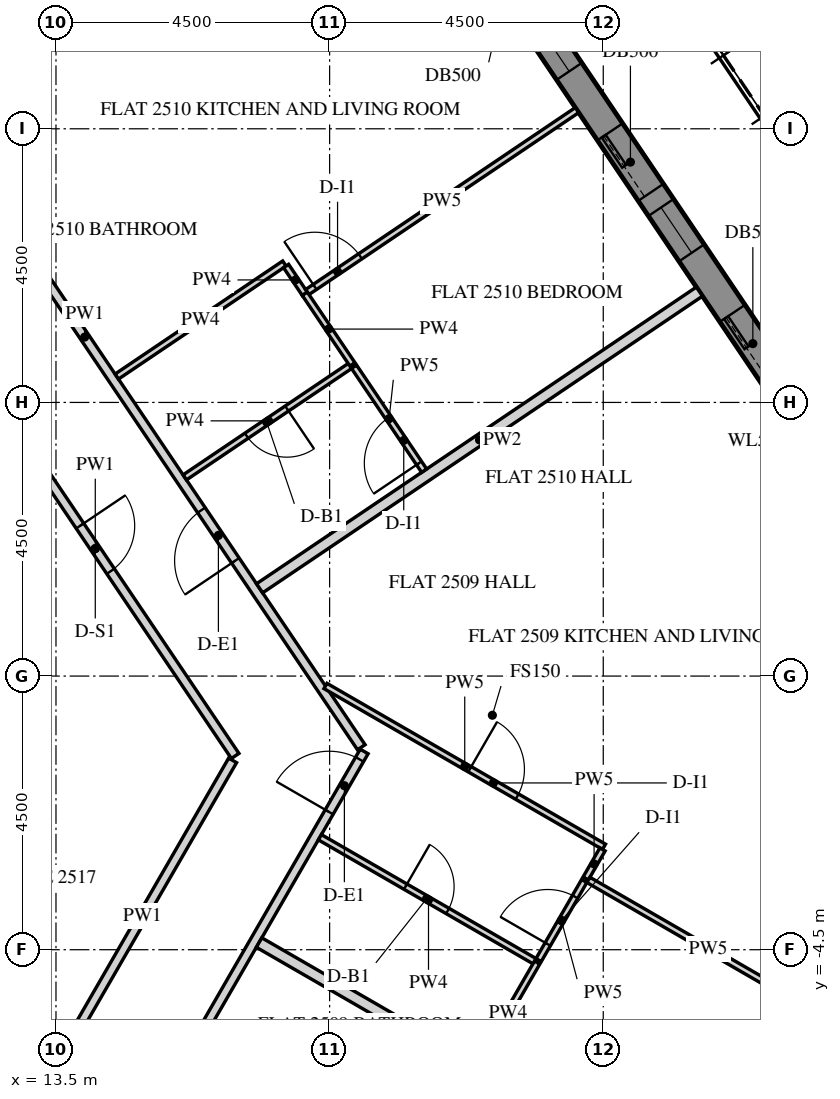
"""IFC4 building model, lengths in metres.
Left out: names, types, materials, properties, quantities, classifications, styles, units other than length and angle.
Written with IfcOpenShell. Run it as: python <this file> out.ifc"""

import sys

from ifc_helpers import new_model, si_unit, direction, frame, frame_2d, origin, place, context, subcontext, project, spatial, polyline, rectangle, outline, extrude, element, fill, save


model = new_model("IFC4")
c1 = context("Model", 3, precision=1e-05, world=origin(), true_north=direction((0.0, 1.0)))
c2 = subcontext(c1, "Body", "Model", "MODEL_VIEW")
j1 = project(units=[si_unit("LENGTHUNIT", "METRE"), si_unit("PLANEANGLEUNIT", "RADIAN")], contexts=[c1])
p1 = place(None, origin())
s1 = spatial("IfcSite", under=j1, at=p1, CompositionType="ELEMENT")
p2 = place(p1, origin())
s2 = spatial("IfcBuilding", under=s1, at=p2, CompositionType="ELEMENT")
p3 = place(p2, frame((0.0, 0.0, 314.7)))
s3 = spatial("IfcBuildingStorey", under=s2, at=p3, CompositionType="ELEMENT", Elevation=314.7)
p4 = place(p3, frame((16.451, -23.005, -0.15), z_axis=(0.0, 0.0, 1.0), x_axis=(0.500003737743, 0.866023245787, 0.0)))
e1 = element("IfcWall", 1, at=p4, inside=s3, PredefinedType="SOLIDWALL", context=c2, shape_type="SweptSolid", body=[
    extrude(outline(polyline([(-0.021, -0.25), (25.468, -0.25), (25.421, 0.25), (0.021, 0.25), (-0.021, -0.25)])), origin(), (0.0, 0.0, 1.0), 3.9),
])
p5 = place(p4, frame((2.522, 0.0, 0.75)))
e2 = element("IfcOpeningElement", 2, at=p5, cuts=e1, PredefinedType="OPENING", context=c2, shape_type="SweptSolid", body=[
    extrude(rectangle(XDim=2.4, YDim=2.7, at=frame_2d((1.2, 1.35))), frame((0.0, 0.26, 0.0), z_axis=(0.0, -1.0, 0.0), x_axis=(1.0, 0.0, 0.0)), (0.0, 0.0, 1.0), 0.52),
])
p6 = place(p4, frame((6.122, 0.0, 0.75)))
e3 = element("IfcOpeningElement", 3, at=p6, cuts=e1, PredefinedType="OPENING", context=c2, shape_type="SweptSolid", body=[
    extrude(rectangle(XDim=2.4, YDim=2.7, at=frame_2d((1.2, 1.35))), frame((0.0, 0.26, 0.0), z_axis=(0.0, -1.0, 0.0), x_axis=(1.0, 0.0, 0.0)), (0.0, 0.0, 1.0), 0.52),
])
p7 = place(p4, frame((9.722, 0.0, 0.75)))
e4 = element("IfcOpeningElement", 4, at=p7, cuts=e1, PredefinedType="OPENING", context=c2, shape_type="SweptSolid", body=[
    extrude(rectangle(XDim=2.4, YDim=2.7, at=frame_2d((1.2, 1.35))), frame((0.0, 0.26, 0.0), z_axis=(0.0, -1.0, 0.0), x_axis=(1.0, 0.0, 0.0)), (0.0, 0.0, 1.0), 0.52),
])
p8 = place(p4, frame((13.323, 0.0, 0.75)))
e5 = element("IfcOpeningElement", 5, at=p8, cuts=e1, PredefinedType="OPENING", context=c2, shape_type="SweptSolid", body=[
    extrude(rectangle(XDim=2.4, YDim=2.7, at=frame_2d((1.2, 1.35))), frame((0.0, 0.26, 0.0), z_axis=(0.0, -1.0, 0.0), x_axis=(1.0, 0.0, 0.0)), (0.0, 0.0, 1.0), 0.52),
])
p9 = place(p4, frame((16.922, 0.0, 0.75)))
e6 = element("IfcOpeningElement", 6, at=p9, cuts=e1, PredefinedType="OPENING", context=c2, shape_type="SweptSolid", body=[
    extrude(rectangle(XDim=2.4, YDim=2.7, at=frame_2d((1.2, 1.35))), frame((0.0, 0.26, 0.0), z_axis=(0.0, -1.0, 0.0), x_axis=(1.0, 0.0, 0.0)), (0.0, 0.0, 1.0), 0.52),
])
p10 = place(p4, frame((20.522, 0.0, 0.75)))
e7 = element("IfcOpeningElement", 7, at=p10, cuts=e1, PredefinedType="OPENING", context=c2, shape_type="SweptSolid", body=[
    extrude(rectangle(XDim=2.4, YDim=2.7, at=frame_2d((1.2, 1.35))), frame((0.0, 0.26, 0.0), z_axis=(0.0, -1.0, 0.0), x_axis=(1.0, 0.0, 0.0)), (0.0, 0.0, 1.0), 0.52),
])
p11 = place(p3, frame((26.706, 2.879, -0.15), z_axis=(0.0, 0.0, 1.0), x_axis=(-0.559197891507, 0.829034208061, 0.0)))
e8 = element("IfcWall", 8, at=p11, inside=s3, PredefinedType="SOLIDWALL", context=c2, shape_type="SweptSolid", body=[
    extrude(outline(polyline([(0.25, -0.25), (22.795, -0.25), (23.295, 0.25), (-0.25, 0.25), (0.25, -0.25)])), origin(), (0.0, 0.0, 1.0), 3.9),
])
p12 = place(p11, frame((1.323, 0.0, 1.05)))
e9 = element("IfcOpeningElement", 9, at=p12, cuts=e8, PredefinedType="OPENING", context=c2, shape_type="SweptSolid", body=[
    extrude(rectangle(XDim=0.9, YDim=1.5, at=frame_2d((0.45, 0.75))), frame((0.0, 0.26, 0.0), z_axis=(0.0, -1.0, 0.0), x_axis=(1.0, 0.0, 0.0)), (0.0, 0.0, 1.0), 0.52),
])
p13 = place(p11, frame((2.522, 0.0, 0.15)))
e10 = element("IfcOpeningElement", 10, at=p13, cuts=e8, PredefinedType="OPENING", context=c2, shape_type="SweptSolid", body=[
    extrude(rectangle(XDim=1.2, YDim=2.4, at=frame_2d((0.6, 1.2))), frame((0.0, 0.26, 0.0), z_axis=(0.0, -1.0, 0.0), x_axis=(1.0, 0.0, 0.0)), (0.0, 0.0, 1.0), 0.52),
])
p14 = place(p11, frame((4.922, 0.0, 1.05)))
e11 = element("IfcOpeningElement", 11, at=p14, cuts=e8, PredefinedType="OPENING", context=c2, shape_type="SweptSolid", body=[
    extrude(rectangle(XDim=0.9, YDim=1.5, at=frame_2d((0.45, 0.75))), frame((0.0, 0.26, 0.0), z_axis=(0.0, -1.0, 0.0), x_axis=(1.0, 0.0, 0.0)), (0.0, 0.0, 1.0), 0.52),
])
p15 = place(p11, frame((6.122, 0.0, 0.15)))
e12 = element("IfcOpeningElement", 12, at=p15, cuts=e8, PredefinedType="OPENING", context=c2, shape_type="SweptSolid", body=[
    extrude(rectangle(XDim=1.2, YDim=2.4, at=frame_2d((0.6, 1.2))), frame((0.0, 0.26, 0.0), z_axis=(0.0, -1.0, 0.0), x_axis=(1.0, 0.0, 0.0)), (0.0, 0.0, 1.0), 0.52),
])
p16 = place(p11, frame((8.522, 0.0, 1.05)))
e13 = element("IfcOpeningElement", 13, at=p16, cuts=e8, PredefinedType="OPENING", context=c2, shape_type="SweptSolid", body=[
    extrude(rectangle(XDim=0.9, YDim=1.5, at=frame_2d((0.45, 0.75))), frame((0.0, 0.26, 0.0), z_axis=(0.0, -1.0, 0.0), x_axis=(1.0, 0.0, 0.0)), (0.0, 0.0, 1.0), 0.52),
])
p17 = place(p11, frame((9.722, 0.0, 0.15)))
e14 = element("IfcOpeningElement", 14, at=p17, cuts=e8, PredefinedType="OPENING", context=c2, shape_type="SweptSolid", body=[
    extrude(rectangle(XDim=1.2, YDim=2.4, at=frame_2d((0.6, 1.2))), frame((0.0, 0.26, 0.0), z_axis=(0.0, -1.0, 0.0), x_axis=(1.0, 0.0, 0.0)), (0.0, 0.0, 1.0), 0.52),
])
p18 = place(p11, frame((12.122, 0.0, 1.05)))
e15 = element("IfcOpeningElement", 15, at=p18, cuts=e8, PredefinedType="OPENING", context=c2, shape_type="SweptSolid", body=[
    extrude(rectangle(XDim=0.9, YDim=1.5, at=frame_2d((0.45, 0.75))), frame((0.0, 0.26, 0.0), z_axis=(0.0, -1.0, 0.0), x_axis=(1.0, 0.0, 0.0)), (0.0, 0.0, 1.0), 0.52),
])
p19 = place(p11, frame((13.323, 0.0, 0.15)))
e16 = element("IfcOpeningElement", 16, at=p19, cuts=e8, PredefinedType="OPENING", context=c2, shape_type="SweptSolid", body=[
    extrude(rectangle(XDim=1.2, YDim=2.4, at=frame_2d((0.6, 1.2))), frame((0.0, 0.26, 0.0), z_axis=(0.0, -1.0, 0.0), x_axis=(1.0, 0.0, 0.0)), (0.0, 0.0, 1.0), 0.52),
])
p20 = place(p11, frame((15.722, 0.0, 1.05)))
e17 = element("IfcOpeningElement", 17, at=p20, cuts=e8, PredefinedType="OPENING", context=c2, shape_type="SweptSolid", body=[
    extrude(rectangle(XDim=0.9, YDim=1.5, at=frame_2d((0.45, 0.75))), frame((0.0, 0.26, 0.0), z_axis=(0.0, -1.0, 0.0), x_axis=(1.0, 0.0, 0.0)), (0.0, 0.0, 1.0), 0.52),
])
p21 = place(p11, frame((16.922, 0.0, 0.15)))
e18 = element("IfcOpeningElement", 18, at=p21, cuts=e8, PredefinedType="OPENING", context=c2, shape_type="SweptSolid", body=[
    extrude(rectangle(XDim=1.2, YDim=2.4, at=frame_2d((0.6, 1.2))), frame((0.0, 0.26, 0.0), z_axis=(0.0, -1.0, 0.0), x_axis=(1.0, 0.0, 0.0)), (0.0, 0.0, 1.0), 0.52),
])
p22 = place(p11, frame((19.323, 0.0, 1.05)))
e19 = element("IfcOpeningElement", 19, at=p22, cuts=e8, PredefinedType="OPENING", context=c2, shape_type="SweptSolid", body=[
    extrude(rectangle(XDim=0.9, YDim=1.5, at=frame_2d((0.45, 0.75))), frame((0.0, 0.26, 0.0), z_axis=(0.0, -1.0, 0.0), x_axis=(1.0, 0.0, 0.0)), (0.0, 0.0, 1.0), 0.52),
])
p23 = place(p11, frame((20.522, 0.0, 0.15)))
e20 = element("IfcOpeningElement", 20, at=p23, cuts=e8, PredefinedType="OPENING", context=c2, shape_type="SweptSolid", body=[
    extrude(rectangle(XDim=1.2, YDim=2.4, at=frame_2d((0.6, 1.2))), frame((0.0, 0.26, 0.0), z_axis=(0.0, -1.0, 0.0), x_axis=(1.0, 0.0, 0.0)), (0.0, 0.0, 1.0), 0.52),
])
p24 = place(p3, frame((11.229, -13.951, 0.0), z_axis=(0.0, 0.0, 1.0), x_axis=(0.499997948852, 0.866026588012, 0.0)))
e21 = element("IfcWall", 21, at=p24, inside=s3, PredefinedType="PARTITIONING", context=c2, shape_type="SweptSolid", body=[
    extrude(rectangle(XDim=14.677, YDim=0.15, at=frame_2d((7.339, 0.0))), origin(), (0.0, 0.0, 1.0), 2.988),
])
p25 = place(p24, frame((1.0, 0.0, 0.0)))
e22 = element("IfcOpeningElement", 22, at=p25, cuts=e21, PredefinedType="OPENING", context=c2, shape_type="SweptSolid", body=[
    extrude(rectangle(XDim=1.0, YDim=2.1, at=frame_2d((0.5, 1.05))), frame((0.0, 0.085, 0.0), z_axis=(0.0, -1.0, 0.0), x_axis=(1.0, 0.0, 0.0)), (0.0, 0.0, 1.0), 0.17),
])
p26 = place(p24, frame((13.527, 0.0, 0.0)))
e23 = element("IfcOpeningElement", 23, at=p26, cuts=e21, PredefinedType="OPENING", context=c2, shape_type="SweptSolid", body=[
    extrude(rectangle(XDim=1.0, YDim=2.1, at=frame_2d((0.5, 1.05))), frame((0.0, 0.085, 0.0), z_axis=(0.0, -1.0, 0.0), x_axis=(1.0, 0.0, 0.0)), (0.0, 0.0, 1.0), 0.17),
])
p27 = place(p3, frame((18.521, -1.171, 0.0), z_axis=(0.0, 0.0, 1.0), x_axis=(-0.559193232449, 0.829037350656, 0.0)))
e24 = element("IfcWall", 24, at=p27, inside=s3, PredefinedType="PARTITIONING", context=c2, shape_type="SweptSolid", body=[
    extrude(rectangle(XDim=16.272, YDim=0.15, at=frame_2d((8.136, 0.0))), origin(), (0.0, 0.0, 1.0), 2.988),
])
p28 = place(p27, frame((3.703, 0.0, 0.0)))
e25 = element("IfcOpeningElement", 25, at=p28, cuts=e24, PredefinedType="OPENING", context=c2, shape_type="SweptSolid", body=[
    extrude(rectangle(XDim=1.0, YDim=2.1, at=frame_2d((0.5, 1.05))), frame((0.0, 0.085, 0.0), z_axis=(0.0, -1.0, 0.0), x_axis=(1.0, 0.0, 0.0)), (0.0, 0.0, 1.0), 0.17),
])
p29 = place(p3, frame((11.846, 5.507, 0.0), z_axis=(0.0, 0.0, 1.0), x_axis=(0.559204754045, -0.829029579119, 0.0)))
e26 = element("IfcWall", 26, at=p29, inside=s3, PredefinedType="PARTITIONING", context=c2, shape_type="SweptSolid", body=[
    extrude(rectangle(XDim=8.228, YDim=0.15, at=frame_2d((4.114, 0.0))), origin(), (0.0, 0.0, 1.0), 2.988),
])
p30 = place(p29, frame((3.664, 0.0, 0.0)))
e27 = element("IfcOpeningElement", 27, at=p30, cuts=e26, PredefinedType="OPENING", context=c2, shape_type="SweptSolid", body=[
    extrude(rectangle(XDim=0.9, YDim=2.1, at=frame_2d((0.45, 1.05))), frame((0.0, 0.085, 0.0), z_axis=(0.0, -1.0, 0.0), x_axis=(1.0, 0.0, 0.0)), (0.0, 0.0, 1.0), 0.17),
])
p31 = place(p3, frame((16.405, -1.386, 0.0), z_axis=(0.0, 0.0, 1.0), x_axis=(-0.500026921216, -0.866009860255, 0.0)))
e28 = element("IfcWall", 28, at=p31, inside=s3, PredefinedType="PARTITIONING", context=c2, shape_type="SweptSolid", body=[
    extrude(rectangle(XDim=5.923, YDim=0.15, at=frame_2d((2.961, 0.0))), origin(), (0.0, 0.0, 1.0), 2.988),
])
p32 = place(p3, frame((24.396, -8.745, 0.0), z_axis=(0.0, 0.0, 1.0), x_axis=(-0.866018297078, 0.500012308975, 0.0)))
e29 = element("IfcWall", 29, at=p32, inside=s3, PredefinedType="PARTITIONING", context=c2, shape_type="SweptSolid", body=[
    extrude(rectangle(XDim=8.725, YDim=0.18, at=frame_2d((4.362, 0.0))), origin(), (0.0, 0.0, 1.0), 2.988),
])
p33 = place(p3, frame((17.932, -0.163, 0.0), z_axis=(0.0, 0.0, 1.0), x_axis=(0.866021868245, -0.500006123685, 0.0)))
e30 = element("IfcWall", 30, at=p33, inside=s3, PredefinedType="PARTITIONING", context=c2, shape_type="SweptSolid", body=[
    extrude(rectangle(XDim=5.29, YDim=0.1, at=frame_2d((2.645, 0.0))), origin(), (0.0, 0.0, 1.0), 2.988),
])
p34 = place(p33, frame((2.739, 0.0, 0.0)))
e31 = element("IfcOpeningElement", 31, at=p34, cuts=e30, PredefinedType="OPENING", context=c2, shape_type="SweptSolid", body=[
    extrude(rectangle(XDim=0.9, YDim=2.1, at=frame_2d((0.45, 1.05))), frame((0.0, 0.06, 0.0), z_axis=(0.0, -1.0, 0.0), x_axis=(1.0, 0.0, 0.0)), (0.0, 0.0, 1.0), 0.12),
])
p35 = place(p3, frame((22.487, -2.851, 0.0), z_axis=(0.0, 0.0, 1.0), x_axis=(-0.499850094852, -0.866111934265, 0.0)))
e32 = element("IfcWall", 32, at=p35, inside=s3, PredefinedType="PARTITIONING", context=c2, shape_type="SweptSolid", body=[
    extrude(rectangle(XDim=0.552, YDim=0.1, at=frame_2d((0.276, 0.0))), origin(), (0.0, 0.0, 1.0), 2.988),
])
p36 = place(p3, frame((22.256, -3.352, 0.0), z_axis=(0.0, 0.0, 1.0), x_axis=(0.866012237902, -0.500022803284, 0.0)))
e33 = element("IfcWall", 33, at=p36, inside=s3, PredefinedType="PARTITIONING", context=c2, shape_type="SweptSolid", body=[
    extrude(rectangle(XDim=4.55, YDim=0.1, at=frame_2d((2.275, 0.0))), origin(), (0.0, 0.0, 1.0), 2.988),
])
p37 = place(p3, frame((24.082, 6.323, 0.0), z_axis=(0.0, 0.0, 1.0), x_axis=(-0.829028989438, -0.559205628254, 0.0)))
e34 = element("IfcWall", 34, at=p37, inside=s3, PredefinedType="PARTITIONING", context=c2, shape_type="SweptSolid", body=[
    extrude(rectangle(XDim=8.725, YDim=0.18, at=frame_2d((4.363, 0.0))), origin(), (0.0, 0.0, 1.0), 2.988),
])
p38 = place(p3, frame((17.84, -2.65, 0.0), z_axis=(0.0, 0.0, 1.0), x_axis=(0.866019999656, -0.500009360108, 0.0)))
e35 = element("IfcWall", 35, at=p38, inside=s3, PredefinedType="PARTITIONING", context=c2, shape_type="SweptSolid", body=[
    extrude(rectangle(XDim=4.125, YDim=0.1, at=frame_2d((2.062, 0.0))), origin(), (0.0, 0.0, 1.0), 2.988),
])
p39 = place(p38, frame((1.625, 0.0, 0.0)))
e36 = element("IfcOpeningElement", 36, at=p39, cuts=e35, PredefinedType="OPENING", context=c2, shape_type="SweptSolid", body=[
    extrude(rectangle(XDim=0.8, YDim=2.1, at=frame_2d((0.4, 1.05))), frame((0.0, 0.06, 0.0), z_axis=(0.0, -1.0, 0.0), x_axis=(1.0, 0.0, 0.0)), (0.0, 0.0, 1.0), 0.12),
])
p40 = place(p3, frame((21.436, -4.671, 0.0), z_axis=(0.0, 0.0, 1.0), x_axis=(0.499985098601, 0.86603400694, 0.0)))
e37 = element("IfcWall", 37, at=p40, inside=s3, PredefinedType="PARTITIONING", context=c2, shape_type="SweptSolid", body=[
    extrude(rectangle(XDim=1.502, YDim=0.1, at=frame_2d((0.751, 0.0))), origin(), (0.0, 0.0, 1.0), 2.988),
])
p41 = place(p40, frame((0.302, 0.0, 0.0)))
e38 = element("IfcOpeningElement", 38, at=p41, cuts=e37, PredefinedType="OPENING", context=c2, shape_type="SweptSolid", body=[
    extrude(rectangle(XDim=0.9, YDim=2.1, at=frame_2d((0.45, 1.05))), frame((0.0, 0.06, 0.0), z_axis=(0.0, -1.0, 0.0), x_axis=(1.0, 0.0, 0.0)), (0.0, 0.0, 1.0), 0.12),
])
p42 = place(p3, frame((20.457, -6.367, 0.0), z_axis=(0.0, 0.0, 1.0), x_axis=(0.499984020225, 0.866034629516, 0.0)))
e39 = element("IfcWall", 39, at=p42, inside=s3, PredefinedType="PARTITIONING", context=c2, shape_type="SweptSolid", body=[
    extrude(rectangle(XDim=1.912, YDim=0.1, at=frame_2d((0.956, 0.0))), origin(), (0.0, 0.0, 1.0), 2.988),
])
p43 = place(p3, frame((14.5, 4.926, 0.0), z_axis=(0.0, 0.0, 1.0), x_axis=(0.829067379225, 0.559148710725, 0.0)))
e40 = element("IfcWall", 40, at=p43, inside=s3, PredefinedType="PARTITIONING", context=c2, shape_type="SweptSolid", body=[
    extrude(rectangle(XDim=3.325, YDim=0.1, at=frame_2d((1.663, 0.0))), origin(), (0.0, 0.0, 1.0), 2.988),
])
p44 = place(p3, frame((17.284, 6.743, 0.0), z_axis=(0.0, 0.0, 1.0), x_axis=(0.55897906803, -0.829181766263, 0.0)))
e41 = element("IfcWall", 41, at=p44, inside=s3, PredefinedType="PARTITIONING", context=c2, shape_type="SweptSolid", body=[
    extrude(rectangle(XDim=0.552, YDim=0.1, at=frame_2d((0.276, 0.0))), origin(), (0.0, 0.0, 1.0), 2.988),
])
p45 = place(p3, frame((17.633, 6.315, 0.0), z_axis=(0.0, 0.0, 1.0), x_axis=(0.82904753069, 0.559178139645, 0.0)))
e42 = element("IfcWall", 42, at=p45, inside=s3, PredefinedType="PARTITIONING", context=c2, shape_type="SweptSolid", body=[
    extrude(rectangle(XDim=5.35, YDim=0.1, at=frame_2d((2.675, 0.0))), origin(), (0.0, 0.0, 1.0), 2.988),
])
p46 = place(p45, frame((0.15, 0.0, 0.0)))
e43 = element("IfcOpeningElement", 43, at=p46, cuts=e42, PredefinedType="OPENING", context=c2, shape_type="SweptSolid", body=[
    extrude(rectangle(XDim=0.9, YDim=2.1, at=frame_2d((0.45, 1.05))), frame((0.0, 0.06, 0.0), z_axis=(0.0, -1.0, 0.0), x_axis=(1.0, 0.0, 0.0)), (0.0, 0.0, 1.0), 0.12),
])
p47 = place(p3, frame((18.375, 5.127, 0.0), z_axis=(0.0, 0.0, 1.0), x_axis=(-0.82903334026, -0.559199178055, 0.0)))
e44 = element("IfcWall", 44, at=p47, inside=s3, PredefinedType="PARTITIONING", context=c2, shape_type="SweptSolid", body=[
    extrude(rectangle(XDim=3.325, YDim=0.1, at=frame_2d((1.663, 0.0))), origin(), (0.0, 0.0, 1.0), 2.988),
])
p48 = place(p47, frame((1.3, 0.0, 0.0)))
e45 = element("IfcOpeningElement", 45, at=p48, cuts=e44, PredefinedType="OPENING", context=c2, shape_type="SweptSolid", body=[
    extrude(rectangle(XDim=0.8, YDim=2.1, at=frame_2d((0.4, 1.05))), frame((0.0, 0.06, 0.0), z_axis=(0.0, -1.0, 0.0), x_axis=(1.0, 0.0, 0.0)), (0.0, 0.0, 1.0), 0.12),
])
p49 = place(p3, frame((19.554, 3.377, 0.0), z_axis=(0.0, 0.0, 1.0), x_axis=(-0.559200338399, 0.829032557584, 0.0)))
e46 = element("IfcWall", 46, at=p49, inside=s3, PredefinedType="PARTITIONING", context=c2, shape_type="SweptSolid", body=[
    extrude(rectangle(XDim=2.062, YDim=0.1, at=frame_2d((1.031, 0.0))), origin(), (0.0, 0.0, 1.0), 2.988),
])
p50 = place(p49, frame((0.15, 0.0, 0.0)))
e47 = element("IfcOpeningElement", 47, at=p50, cuts=e46, PredefinedType="OPENING", context=c2, shape_type="SweptSolid", body=[
    extrude(rectangle(XDim=0.9, YDim=2.1, at=frame_2d((0.45, 1.05))), frame((0.0, 0.06, 0.0), z_axis=(0.0, -1.0, 0.0), x_axis=(1.0, 0.0, 0.0)), (0.0, 0.0, 1.0), 0.12),
])
p51 = place(p3, frame((18.376, 5.125, 0.0), z_axis=(0.0, 0.0, 1.0), x_axis=(-0.559152802616, 0.829064619512, 0.0)))
e48 = element("IfcWall", 48, at=p51, inside=s3, PredefinedType="PARTITIONING", context=c2, shape_type="SweptSolid", body=[
    extrude(rectangle(XDim=1.402, YDim=0.1, at=frame_2d((0.701, 0.0))), origin(), (0.0, 0.0, 1.0), 2.988),
])
p52 = place(p13, frame((0.0, 0.175, 0.0)))
e49 = element("IfcDoor", 49, at=p52, inside=s3, OperationType="SLIDING_TO_LEFT", PredefinedType="DOOR", context=c2, shape_type="SweptSolid", body=[
    extrude(rectangle(XDim=1.2, YDim=2.4, at=frame_2d((0.6, 1.2))), frame((0.0, 0.025, 0.0), z_axis=(0.0, -1.0, 0.0), x_axis=(1.0, 0.0, 0.0)), (0.0, 0.0, 1.0), 0.05),
])
fill(e10, e49)
p53 = place(p14, frame((0.0, 0.18, 0.0)))
e50 = element("IfcWindow", 50, at=p53, inside=s3, PartitioningType="SINGLE_PANEL", PredefinedType="WINDOW", context=c2, shape_type="SweptSolid", body=[
    extrude(rectangle(XDim=0.9, YDim=1.5, at=frame_2d((0.45, 0.75))), frame((0.0, 0.03, 0.0), z_axis=(0.0, -1.0, 0.0), x_axis=(1.0, 0.0, 0.0)), (0.0, 0.0, 1.0), 0.06),
])
fill(e11, e50)
p54 = place(p15, frame((0.0, 0.175, 0.0)))
e51 = element("IfcDoor", 51, at=p54, inside=s3, OperationType="SLIDING_TO_LEFT", PredefinedType="DOOR", context=c2, shape_type="SweptSolid", body=[
    extrude(rectangle(XDim=1.2, YDim=2.4, at=frame_2d((0.6, 1.2))), frame((0.0, 0.025, 0.0), z_axis=(0.0, -1.0, 0.0), x_axis=(1.0, 0.0, 0.0)), (0.0, 0.0, 1.0), 0.05),
])
fill(e12, e51)
p55 = place(p16, frame((0.0, 0.18, 0.0)))
e52 = element("IfcWindow", 52, at=p55, inside=s3, PartitioningType="SINGLE_PANEL", PredefinedType="WINDOW", context=c2, shape_type="SweptSolid", body=[
    extrude(rectangle(XDim=0.9, YDim=1.5, at=frame_2d((0.45, 0.75))), frame((0.0, 0.03, 0.0), z_axis=(0.0, -1.0, 0.0), x_axis=(1.0, 0.0, 0.0)), (0.0, 0.0, 1.0), 0.06),
])
fill(e13, e52)
p56 = place(p26, origin())
e53 = element("IfcDoor", 53, at=p56, inside=s3, OperationType="SINGLE_SWING_LEFT", PredefinedType="DOOR", context=c2, shape_type="SweptSolid", body=[
    extrude(rectangle(XDim=1.0, YDim=2.1, at=frame_2d((0.5, 1.05))), frame((0.0, 0.025, 0.0), z_axis=(0.0, -1.0, 0.0), x_axis=(1.0, 0.0, 0.0)), (0.0, 0.0, 1.0), 0.05),
])
fill(e23, e53)
p57 = place(p39, origin())
e54 = element("IfcDoor", 54, at=p57, inside=s3, OperationType="SINGLE_SWING_RIGHT", PredefinedType="DOOR", context=c2, shape_type="SweptSolid", body=[
    extrude(rectangle(XDim=0.8, YDim=2.1, at=frame_2d((0.4, 1.05))), frame((0.0, 0.025, 0.0), z_axis=(0.0, -1.0, 0.0), x_axis=(1.0, 0.0, 0.0)), (0.0, 0.0, 1.0), 0.05),
])
fill(e36, e54)
p58 = place(p34, origin())
e55 = element("IfcDoor", 55, at=p58, inside=s3, OperationType="SINGLE_SWING_LEFT", PredefinedType="DOOR", context=c2, shape_type="SweptSolid", body=[
    extrude(rectangle(XDim=0.9, YDim=2.1, at=frame_2d((0.45, 1.05))), frame((0.0, 0.025, 0.0), z_axis=(0.0, -1.0, 0.0), x_axis=(1.0, 0.0, 0.0)), (0.0, 0.0, 1.0), 0.05),
])
fill(e31, e55)
p59 = place(p41, origin())
e56 = element("IfcDoor", 56, at=p59, inside=s3, OperationType="SINGLE_SWING_LEFT", PredefinedType="DOOR", context=c2, shape_type="SweptSolid", body=[
    extrude(rectangle(XDim=0.9, YDim=2.1, at=frame_2d((0.45, 1.05))), frame((0.0, 0.025, 0.0), z_axis=(0.0, -1.0, 0.0), x_axis=(1.0, 0.0, 0.0)), (0.0, 0.0, 1.0), 0.05),
])
fill(e38, e56)
p60 = place(p28, origin())
e57 = element("IfcDoor", 57, at=p60, inside=s3, OperationType="SINGLE_SWING_RIGHT", PredefinedType="DOOR", context=c2, shape_type="SweptSolid", body=[
    extrude(rectangle(XDim=1.0, YDim=2.1, at=frame_2d((0.5, 1.05))), frame((0.0, 0.025, 0.0), z_axis=(0.0, -1.0, 0.0), x_axis=(1.0, 0.0, 0.0)), (0.0, 0.0, 1.0), 0.05),
])
fill(e25, e57)
p61 = place(p48, origin())
e58 = element("IfcDoor", 58, at=p61, inside=s3, OperationType="SINGLE_SWING_LEFT", PredefinedType="DOOR", context=c2, shape_type="SweptSolid", body=[
    extrude(rectangle(XDim=0.8, YDim=2.1, at=frame_2d((0.4, 1.05))), frame((0.0, 0.025, 0.0), z_axis=(0.0, -1.0, 0.0), x_axis=(1.0, 0.0, 0.0)), (0.0, 0.0, 1.0), 0.05),
])
fill(e45, e58)
p62 = place(p50, origin())
e59 = element("IfcDoor", 59, at=p62, inside=s3, OperationType="SINGLE_SWING_LEFT", PredefinedType="DOOR", context=c2, shape_type="SweptSolid", body=[
    extrude(rectangle(XDim=0.9, YDim=2.1, at=frame_2d((0.45, 1.05))), frame((0.0, 0.025, 0.0), z_axis=(0.0, -1.0, 0.0), x_axis=(1.0, 0.0, 0.0)), (0.0, 0.0, 1.0), 0.05),
])
fill(e47, e59)
p63 = place(p46, origin())
e60 = element("IfcDoor", 60, at=p63, inside=s3, OperationType="SINGLE_SWING_RIGHT", PredefinedType="DOOR", context=c2, shape_type="SweptSolid", body=[
    extrude(rectangle(XDim=0.9, YDim=2.1, at=frame_2d((0.45, 1.05))), frame((0.0, 0.025, 0.0), z_axis=(0.0, -1.0, 0.0), x_axis=(1.0, 0.0, 0.0)), (0.0, 0.0, 1.0), 0.05),
])
fill(e43, e60)
p64 = place(p30, origin())
e61 = element("IfcDoor", 61, at=p64, inside=s3, OperationType="SINGLE_SWING_LEFT", PredefinedType="DOOR", context=c2, shape_type="SweptSolid", body=[
    extrude(rectangle(XDim=0.9, YDim=2.1, at=frame_2d((0.45, 1.05))), frame((0.0, 0.025, 0.0), z_axis=(0.0, -1.0, 0.0), x_axis=(1.0, 0.0, 0.0)), (0.0, 0.0, 1.0), 0.05),
])
fill(e27, e61)
save(model, sys.argv[1])
